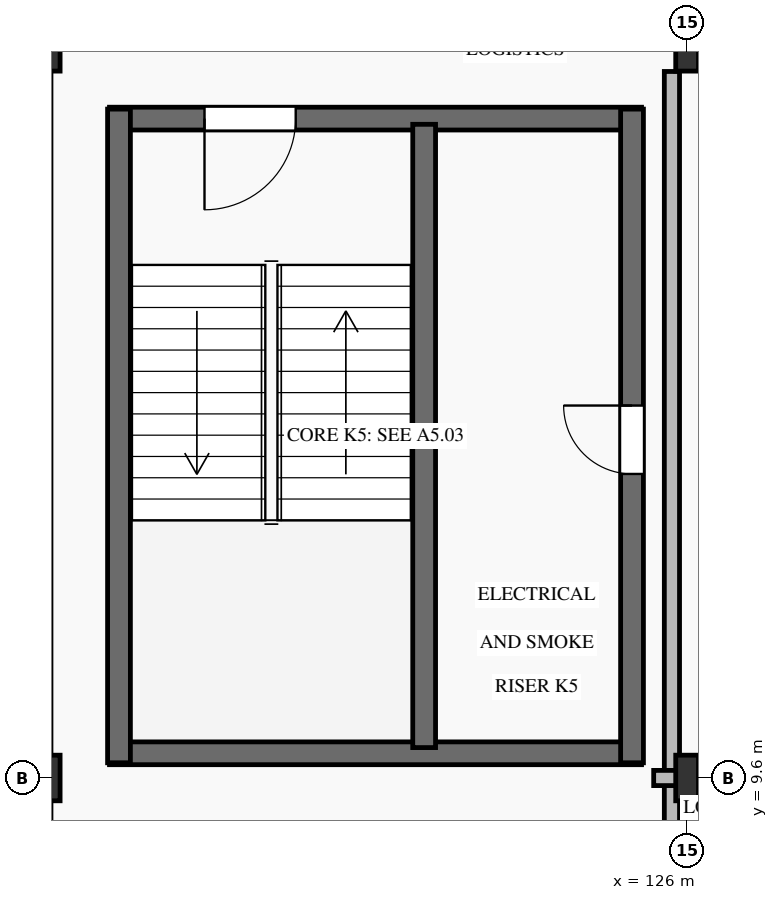
"""IFC4 building model, lengths in metres.
Left out: names, types, materials, properties, quantities, classifications, styles, units other than length and angle.
Written with IfcOpenShell. Run it as: python <this file> out.ifc"""

import sys

from ifc_helpers import new_model, si_unit, direction, frame, frame_2d, origin, origin_2d, place, context, subcontext, project, spatial, rectangle, i_section, extrude, element, fill, save


model = new_model("IFC4")
c1 = context("Model", 3, precision=1e-05, world=origin(), true_north=direction((0.0, 1.0)))
c2 = subcontext(c1, "Body", "Model", "MODEL_VIEW")
j1 = project(units=[si_unit("LENGTHUNIT", "METRE"), si_unit("PLANEANGLEUNIT", "RADIAN")], contexts=[c1])
p1 = place(None, origin())
s1 = spatial("IfcSite", under=j1, at=p1, CompositionType="ELEMENT")
p2 = place(p1, origin())
s2 = spatial("IfcBuilding", under=s1, at=p2, CompositionType="ELEMENT")
p3 = place(p2, frame((0.0, 0.0, -4.5)))
s3 = spatial("IfcBuildingStorey", under=s2, at=p3, CompositionType="ELEMENT", Elevation=-4.5)
for number, where, z_axis, x_axis in (
    (1, (117.6, 9.6, 0.0), (0.0, 0.0, 1.0), (1.0, 0.0, 0.0)),
    (2, (117.6, 19.2, 0.0), (0.0, 0.0, 1.0), (1.0, 0.0, 0.0)),
    (3, (126.0, 9.6, 0.0), (0.0, 0.0, 1.0), (1.0, 0.0, 0.0)),
    (4, (126.0, 19.2, 0.0), (0.0, 0.0, 1.0), (1.0, 0.0, 0.0)),
):
    element("IfcColumn", number, at=place(p3, frame(where, z_axis=z_axis, x_axis=x_axis)), inside=s3, PredefinedType="COLUMN", context=c2, shape_type="SweptSolid", body=[
        extrude(i_section(OverallWidth=0.3, OverallDepth=0.6, WebThickness=0.015, FlangeThickness=0.03, FilletRadius=0.027, at=origin_2d()), origin(), (0.0, 0.0, 1.0), 4.5),
    ])
p4 = place(p3, frame((118.4, 9.925, 0.0), z_axis=(0.0, 0.0, 1.0), x_axis=(1.0, 0.0, 0.0)))
e5 = element("IfcWall", 5, at=p4, inside=s3, PredefinedType="SHEAR", context=c2, shape_type="SweptSolid", body=[
    extrude(rectangle(XDim=7.0, YDim=0.3, at=frame_2d((3.5, 0.0))), origin(), (0.0, 0.0, 1.0), 4.5),
])
p5 = place(p3, frame((118.4, 18.275, 0.0), z_axis=(0.0, 0.0, 1.0), x_axis=(1.0, 0.0, 0.0)))
e6 = element("IfcWall", 6, at=p5, inside=s3, PredefinedType="SHEAR", context=c2, shape_type="SweptSolid", body=[
    extrude(rectangle(XDim=7.0, YDim=0.3, at=frame_2d((3.5, 0.0))), origin(), (0.0, 0.0, 1.0), 4.5),
])
p6 = place(p5, frame((1.25, 0.0, 0.0)))
e7 = element("IfcOpeningElement", 7, at=p6, cuts=e6, PredefinedType="OPENING", context=c2, shape_type="SweptSolid", body=[
    extrude(rectangle(XDim=1.2, YDim=2.15, at=frame_2d((0.6, 1.075))), frame((0.0, 0.165, 0.0), z_axis=(0.0, -1.0, 0.0), x_axis=(1.0, 0.0, 0.0)), (0.0, 0.0, 1.0), 0.33),
])
p7 = place(p3, frame((118.525, 9.8, 0.0), z_axis=(0.0, 0.0, 1.0), x_axis=(0.0, 1.0, 0.0)))
e8 = element("IfcWall", 8, at=p7, inside=s3, PredefinedType="SHEAR", context=c2, shape_type="SweptSolid", body=[
    extrude(rectangle(XDim=8.6, YDim=0.3, at=frame_2d((4.3, 0.0))), origin(), (0.0, 0.0, 1.0), 4.5),
])
p8 = place(p3, frame((125.275, 9.8, 0.0), z_axis=(0.0, 0.0, 1.0), x_axis=(0.0, 1.0, 0.0)))
e9 = element("IfcWall", 9, at=p8, inside=s3, PredefinedType="SHEAR", context=c2, shape_type="SweptSolid", body=[
    extrude(rectangle(XDim=8.6, YDim=0.3, at=frame_2d((4.3, 0.0))), origin(), (0.0, 0.0, 1.0), 4.5),
])
p9 = place(p8, frame((3.8, 0.0, 0.0)))
e10 = element("IfcOpeningElement", 10, at=p9, cuts=e9, PredefinedType="OPENING", context=c2, shape_type="SweptSolid", body=[
    extrude(rectangle(XDim=0.9, YDim=2.05, at=frame_2d((0.45, 1.025))), frame((0.0, 0.165, 0.0), z_axis=(0.0, -1.0, 0.0), x_axis=(1.0, 0.0, 0.0)), (0.0, 0.0, 1.0), 0.33),
])
p10 = place(p3, frame((122.54, 10.0, 0.0), z_axis=(0.0, 0.0, 1.0), x_axis=(0.0, 1.0, 0.0)))
e11 = element("IfcWall", 11, at=p10, inside=s3, PredefinedType="SHEAR", context=c2, shape_type="SweptSolid", body=[
    extrude(rectangle(XDim=8.2, YDim=0.3, at=frame_2d((4.1, 0.0))), origin(), (0.0, 0.0, 1.0), 4.5),
])
p11 = place(p3, frame((125.8, 0.475, 0.0), z_axis=(0.0, 0.0, 1.0), x_axis=(0.0, 1.0, 0.0)))
e12 = element("IfcWall", 12, at=p11, inside=s3, PredefinedType="PARTITIONING", context=c2, shape_type="SweptSolid", body=[
    extrude(rectangle(XDim=18.42, YDim=0.2, at=frame_2d((9.21, 0.0))), origin(), (0.0, 0.0, 1.0), 3.91),
])
p12 = place(p11, frame((5.475, 0.0, 0.0)))
e13 = element("IfcOpeningElement", 13, at=p12, cuts=e12, PredefinedType="OPENING", context=c2, shape_type="SweptSolid", body=[
    extrude(rectangle(XDim=1.5, YDim=2.25, at=frame_2d((0.75, 1.125))), frame((0.0, 0.115, 0.0), z_axis=(0.0, -1.0, 0.0), x_axis=(1.0, 0.0, 0.0)), (0.0, 0.0, 1.0), 0.23),
])
p13 = place(p3, frame((125.56, 9.6, 0.0), z_axis=(0.0, 0.0, 1.0), x_axis=(1.0, 0.0, 0.0)))
e14 = element("IfcWall", 14, at=p13, inside=s3, PredefinedType="PARTITIONING", context=c2, shape_type="SweptSolid", body=[
    extrude(rectangle(XDim=10.08, YDim=0.2, at=frame_2d((5.04, 0.0))), origin(), (0.0, 0.0, 1.0), 3.61),
])
p14 = place(p13, frame((4.29, 0.0, 0.0)))
e15 = element("IfcOpeningElement", 15, at=p14, cuts=e14, PredefinedType="OPENING", context=c2, shape_type="SweptSolid", body=[
    extrude(rectangle(XDim=1.5, YDim=2.25, at=frame_2d((0.75, 1.125))), frame((0.0, 0.115, 0.0), z_axis=(0.0, -1.0, 0.0), x_axis=(1.0, 0.0, 0.0)), (0.0, 0.0, 1.0), 0.23),
])
p15 = place(p6, frame((1.2, 0.0, 0.0), z_axis=(0.0, 0.0, 1.0), x_axis=(-1.0, 0.0, 0.0)))
e16 = element("IfcDoor", 16, at=p15, inside=s3, OperationType="SINGLE_SWING_LEFT", PredefinedType="DOOR", context=c2, shape_type="SweptSolid", body=[
    extrude(rectangle(XDim=1.2, YDim=2.15, at=frame_2d((0.6, 1.075))), frame((0.0, 0.025, 0.0), z_axis=(0.0, -1.0, 0.0), x_axis=(1.0, 0.0, 0.0)), (0.0, 0.0, 1.0), 0.05),
])
fill(e7, e16)
p16 = place(p9, origin())
e17 = element("IfcDoor", 17, at=p16, inside=s3, OperationType="SINGLE_SWING_RIGHT", PredefinedType="DOOR", context=c2, shape_type="SweptSolid", body=[
    extrude(rectangle(XDim=0.9, YDim=2.05, at=frame_2d((0.45, 1.025))), frame((0.0, 0.025, 0.0), z_axis=(0.0, -1.0, 0.0), x_axis=(1.0, 0.0, 0.0)), (0.0, 0.0, 1.0), 0.05),
])
fill(e10, e17)
save(model, sys.argv[1])
